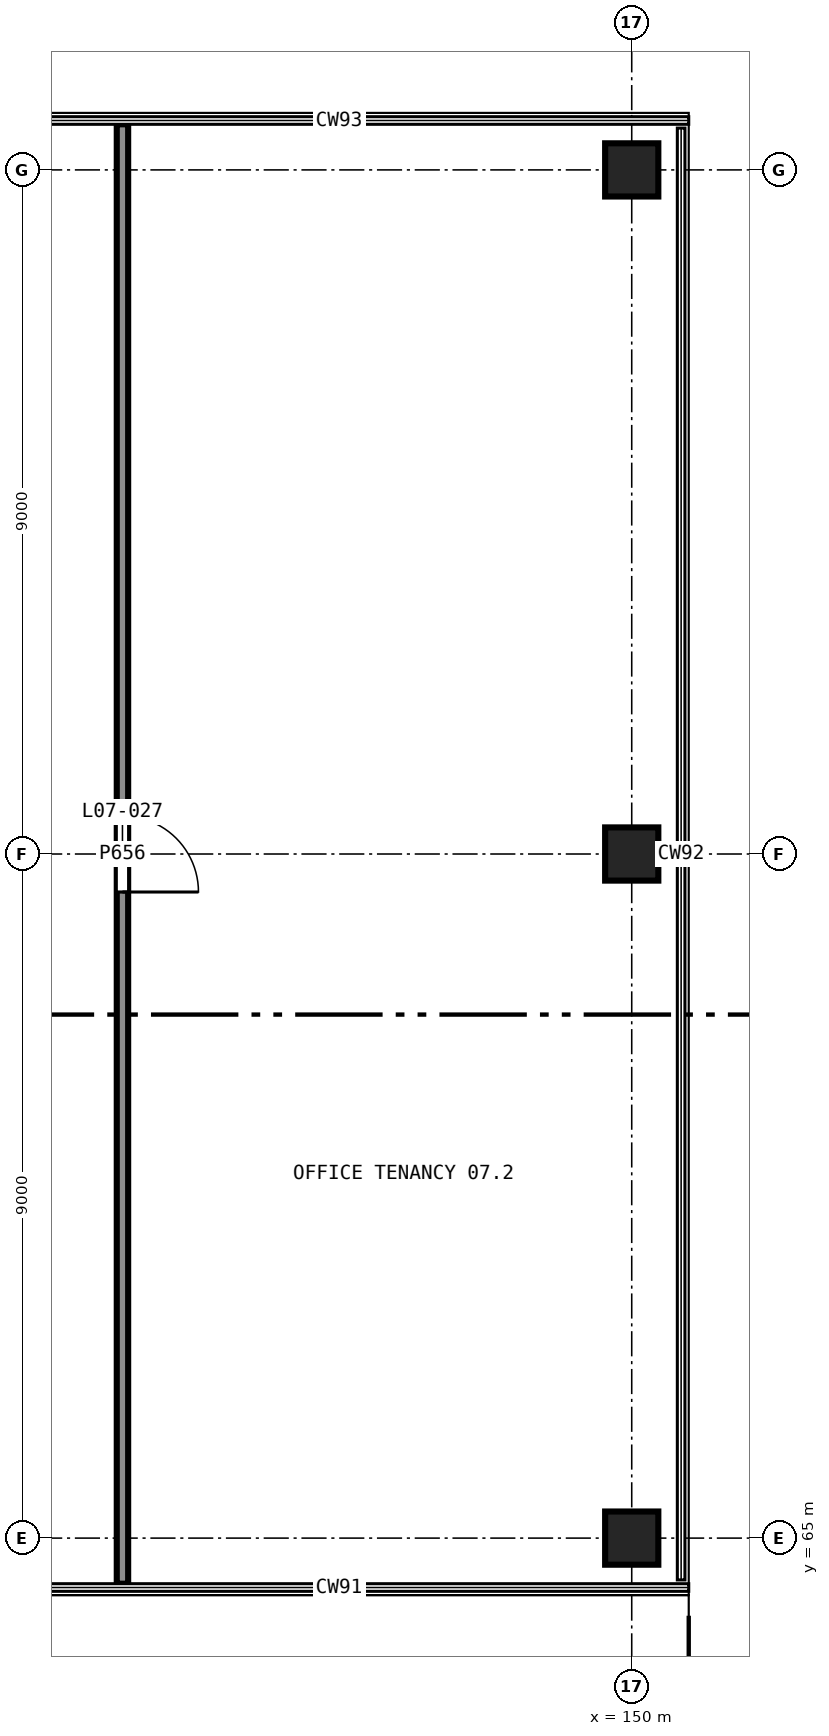
"""IFC4 building model, lengths in metres.
Left out: names, types, materials, properties, quantities, classifications, styles, units other than length and angle.
Written with IfcOpenShell. Run it as: python <this file> out.ifc"""

import sys

from ifc_helpers import new_model, si_unit, direction, frame, frame_2d, origin, origin_2d, place, context, subcontext, project, spatial, rectangle, extrude, element, fill, save


model = new_model("IFC4")
c1 = context("Model", 3, precision=1e-05, world=origin(), true_north=direction((0.0, 1.0)))
c2 = subcontext(c1, "Body", "Model", "MODEL_VIEW")
j1 = project(units=[si_unit("LENGTHUNIT", "METRE"), si_unit("PLANEANGLEUNIT", "RADIAN")], contexts=[c1])
p1 = place(None, origin())
s1 = spatial("IfcSite", under=j1, at=p1, CompositionType="ELEMENT")
p2 = place(p1, origin())
s2 = spatial("IfcBuilding", under=s1, at=p2, CompositionType="ELEMENT")
p3 = place(p2, frame((0.0, 0.0, 29.5)))
s3 = spatial("IfcBuildingStorey", under=s2, at=p3, CompositionType="ELEMENT", Elevation=29.5)
for number, where, z_axis, x_axis in (
    (1, (150.0, 65.0, 0.0), (0.0, 0.0, 1.0), (1.0, 0.0, 0.0)),
    (2, (150.0, 74.0, 0.0), (0.0, 0.0, 1.0), (1.0, 0.0, 0.0)),
    (3, (150.0, 83.0, 0.0), (0.0, 0.0, 1.0), (1.0, 0.0, 0.0)),
):
    element("IfcColumn", number, at=place(p3, frame(where, z_axis=z_axis, x_axis=x_axis)), inside=s3, PredefinedType="COLUMN", context=c2, shape_type="SweptSolid", body=[
        extrude(rectangle(XDim=0.7, YDim=0.7, at=origin_2d()), origin(), (0.0, 0.0, 1.0), 4.0),
    ])
p4 = place(p3, frame((143.3, 83.6, 0.0), z_axis=(0.0, 0.0, 1.0), x_axis=(0.0, -1.0, 0.0)))
e4 = element("IfcWall", 4, at=p4, inside=s3, PredefinedType="PARTITIONING", context=c2, shape_type="SweptSolid", body=[
    extrude(rectangle(XDim=19.2, YDim=0.15, at=frame_2d((9.6, 0.0))), origin(), (0.0, 0.0, 1.0), 3.75),
])
p5 = place(p4, frame((9.1, 0.0, 0.0)))
e5 = element("IfcOpeningElement", 5, at=p5, cuts=e4, PredefinedType="OPENING", context=c2, shape_type="SweptSolid", body=[
    extrude(rectangle(XDim=1.0, YDim=2.1, at=frame_2d((0.5, 1.05))), frame((0.0, 0.085, 0.0), z_axis=(0.0, -1.0, 0.0), x_axis=(1.0, 0.0, 0.0)), (0.0, 0.0, 1.0), 0.17),
])
p6 = place(p5, origin())
e6 = element("IfcDoor", 6, at=p6, inside=s3, OperationType="SINGLE_SWING_LEFT", PredefinedType="DOOR", context=c2, shape_type="SweptSolid", body=[
    extrude(rectangle(XDim=1.0, YDim=2.1, at=frame_2d((0.5, 1.05))), frame((0.0, 0.025, 0.0), z_axis=(0.0, -1.0, 0.0), x_axis=(1.0, 0.0, 0.0)), (0.0, 0.0, 1.0), 0.05),
])
fill(e5, e6)
save(model, sys.argv[1])
